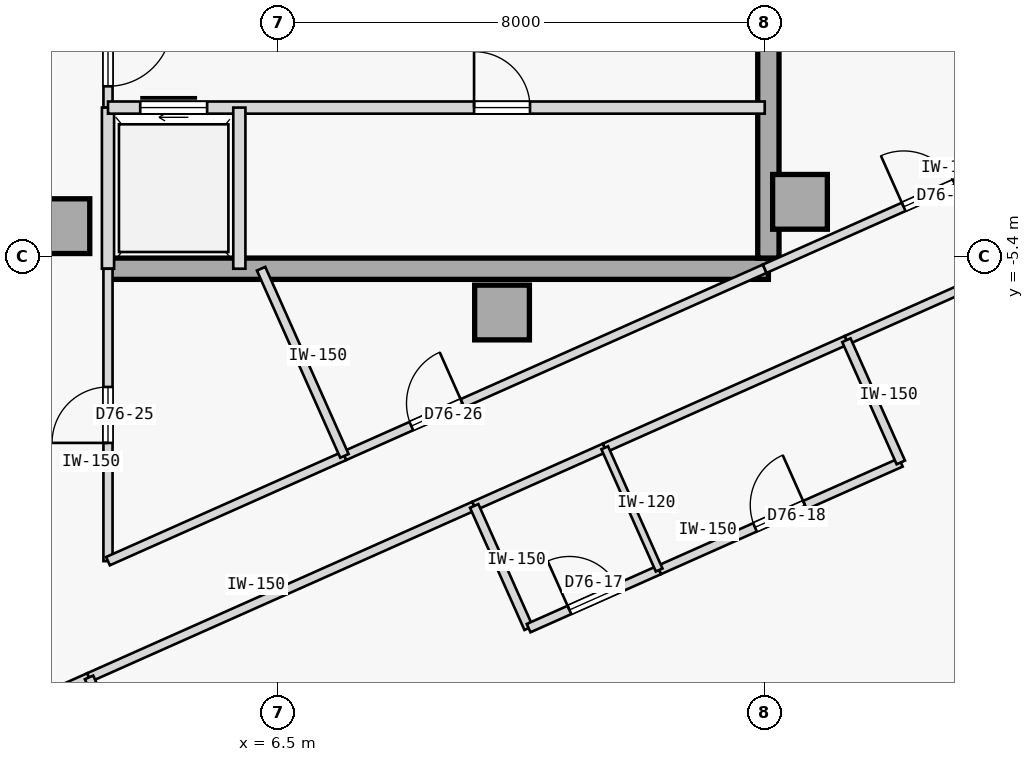
"""IFC4 building model, lengths in metres.
Left out: names, types, materials, properties, quantities, classifications, styles, units other than length and angle.
Written with IfcOpenShell. Run it as: python <this file> out.ifc"""

import sys

from ifc_helpers import new_model, si_unit, direction, frame, frame_2d, origin, origin_2d, place, context, subcontext, project, spatial, rectangle, extrude, element, fill, save


model = new_model("IFC4")
c1 = context("Model", 3, precision=1e-05, world=origin(), true_north=direction((0.0, 1.0)))
c2 = subcontext(c1, "Body", "Model", "MODEL_VIEW")
j1 = project(units=[si_unit("LENGTHUNIT", "METRE"), si_unit("PLANEANGLEUNIT", "RADIAN")], contexts=[c1])
p1 = place(None, origin())
s1 = spatial("IfcSite", under=j1, at=p1, CompositionType="ELEMENT")
p2 = place(p1, origin())
s2 = spatial("IfcBuilding", under=s1, at=p2, CompositionType="ELEMENT")
p3 = place(p2, frame((0.0, 0.0, 285.25)))
s3 = spatial("IfcBuildingStorey", under=s2, at=p3, CompositionType="ELEMENT", Elevation=285.25)
for number, where, z_axis, x_axis in (
    (1, (15.08, -4.5, 0.0), (0.0, 0.0, 1.0), (1.0, 0.0, 0.0)),
    (2, (10.18, -6.32, 0.0), (0.0, 0.0, 1.0), (1.0, 0.0, 0.0)),
    (3, (2.95, -4.9, 0.0), (0.0, 0.0, 1.0), (1.0, 0.0, 0.0)),
):
    element("IfcColumn", number, at=place(p3, frame(where, z_axis=z_axis, x_axis=x_axis)), inside=s3, PredefinedType="COLUMN", context=c2, shape_type="SweptSolid", body=[
        extrude(rectangle(XDim=0.9, YDim=0.9, at=origin_2d()), origin(), (0.0, 0.0, 1.0), 3.35),
    ])
p4 = place(p3, frame((3.7, -5.6, 0.0), z_axis=(0.0, 0.0, 1.0), x_axis=(1.0, 0.0, 0.0)))
e4 = element("IfcWall", 4, at=p4, inside=s3, PredefinedType="SHEAR", context=c2, shape_type="SweptSolid", body=[
    extrude(rectangle(XDim=10.86, YDim=0.35, at=frame_2d((5.43, 0.0))), origin(), (0.0, 0.0, 1.0), 3.125),
])
p5 = place(p3, frame((14.56, -5.425, 0.0), z_axis=(0.0, 0.0, 1.0), x_axis=(0.0, 1.0, 0.0)))
e5 = element("IfcWall", 5, at=p5, inside=s3, PredefinedType="SHEAR", context=c2, shape_type="SweptSolid", body=[
    extrude(rectangle(XDim=10.85, YDim=0.35, at=frame_2d((5.425, 0.0))), origin(), (0.0, 0.0, 1.0), 3.125),
])
p6 = place(p3, frame((3.7, -2.95, 0.0), z_axis=(0.0, 0.0, 1.0), x_axis=(0.0, 1.0, 0.0)))
e6 = element("IfcWall", 6, at=p6, inside=s3, PredefinedType="PARTITIONING", context=c2, shape_type="SweptSolid", body=[
    extrude(rectangle(XDim=1.8, YDim=0.15, at=frame_2d((0.9, 0.0))), origin(), (0.0, 0.0, 1.0), 3.125),
])
p7 = place(p6, frame((0.35, 0.0, 0.0)))
e7 = element("IfcOpeningElement", 7, at=p7, cuts=e6, PredefinedType="OPENING", context=c2, shape_type="SweptSolid", body=[
    extrude(rectangle(XDim=1.05, YDim=2.18, at=frame_2d((0.525, 1.09))), frame((0.0, 0.085, 0.0), z_axis=(0.0, -1.0, 0.0), x_axis=(1.0, 0.0, 0.0)), (0.0, 0.0, 1.0), 0.17),
])
p8 = place(p3, frame((3.7, -5.6, 0.0), z_axis=(0.0, 0.0, 1.0), x_axis=(0.0, 1.0, 0.0)))
e8 = element("IfcWall", 8, at=p8, inside=s3, PredefinedType="STANDARD", context=c2, shape_type="SweptSolid", body=[
    extrude(rectangle(XDim=2.65, YDim=0.2, at=frame_2d((1.325, 0.0))), origin(), (0.0, 0.0, 1.0), 3.125),
])
p9 = place(p3, frame((3.7, -2.95, 0.0), z_axis=(0.0, 0.0, 1.0), x_axis=(1.0, 0.0, 0.0)))
e9 = element("IfcWall", 9, at=p9, inside=s3, PredefinedType="STANDARD", context=c2, shape_type="SweptSolid", body=[
    extrude(rectangle(XDim=10.8, YDim=0.2, at=frame_2d((5.4, 0.0))), origin(), (0.0, 0.0, 1.0), 3.125),
])
p10 = place(p9, frame((0.53, 0.0, 0.0)))
e10 = element("IfcOpeningElement", 10, at=p10, cuts=e9, PredefinedType="OPENING", context=c2, shape_type="SweptSolid", body=[
    extrude(rectangle(XDim=1.1, YDim=2.15, at=frame_2d((0.55, 1.075))), frame((0.0, 0.11, 0.0), z_axis=(0.0, -1.0, 0.0), x_axis=(1.0, 0.0, 0.0)), (0.0, 0.0, 1.0), 0.22),
])
p11 = place(p9, frame((6.02, 0.0, 0.0)))
e11 = element("IfcOpeningElement", 11, at=p11, cuts=e9, PredefinedType="OPENING", context=c2, shape_type="SweptSolid", body=[
    extrude(rectangle(XDim=0.92, YDim=2.15, at=frame_2d((0.46, 1.075))), frame((0.0, 0.11, 0.0), z_axis=(0.0, -1.0, 0.0), x_axis=(1.0, 0.0, 0.0)), (0.0, 0.0, 1.0), 0.22),
])
p12 = place(p3, frame((5.86, -5.6, 0.0), z_axis=(0.0, 0.0, 1.0), x_axis=(0.0, 1.0, 0.0)))
e12 = element("IfcWall", 12, at=p12, inside=s3, PredefinedType="STANDARD", context=c2, shape_type="SweptSolid", body=[
    extrude(rectangle(XDim=2.65, YDim=0.2, at=frame_2d((1.325, 0.0))), origin(), (0.0, 0.0, 1.0), 3.125),
])
p13 = place(p3, frame((-8.481, -17.605, 0.0), z_axis=(0.0, 0.0, 1.0), x_axis=(0.913546352883, 0.406734632328, 0.0)))
e13 = element("IfcWall", 13, at=p13, inside=s3, PredefinedType="PARTITIONING", context=c2, shape_type="SweptSolid", body=[
    extrude(rectangle(XDim=12.993, YDim=0.15, at=frame_2d((6.497, 0.0))), origin(), (0.0, 0.0, 1.0), 3.125),
])
p14 = place(p13, frame((6.021, 0.0, 0.0)))
e14 = element("IfcOpeningElement", 14, at=p14, cuts=e13, PredefinedType="OPENING", context=c2, shape_type="SweptSolid", body=[
    extrude(rectangle(XDim=0.95, YDim=2.15, at=frame_2d((0.475, 1.075))), frame((0.0, 0.085, 0.0), z_axis=(0.0, -1.0, 0.0), x_axis=(1.0, 0.0, 0.0)), (0.0, 0.0, 1.0), 0.17),
])
p15 = place(p3, frame((3.388, -12.321, 0.0), z_axis=(0.0, 0.0, 1.0), x_axis=(0.913552886643, 0.406719956857, 0.0)))
e15 = element("IfcWall", 15, at=p15, inside=s3, PredefinedType="PARTITIONING", context=c2, shape_type="SweptSolid", body=[
    extrude(rectangle(XDim=6.933, YDim=0.15, at=frame_2d((3.467, 0.0))), origin(), (0.0, 0.0, 1.0), 3.125),
])
p16 = place(p3, frame((15.843, -6.776, 0.0), z_axis=(0.0, 0.0, 1.0), x_axis=(0.913541183414, 0.406746243015, 0.0)))
e16 = element("IfcWall", 16, at=p16, inside=s3, PredefinedType="PARTITIONING", context=c2, shape_type="SweptSolid", body=[
    extrude(rectangle(XDim=17.999, YDim=0.15, at=frame_2d((9.0, 0.0))), origin(), (0.0, 0.0, 1.0), 3.125),
])
p17 = place(p16, frame((8.524, 0.0, 0.0)))
e17 = element("IfcOpeningElement", 17, at=p17, cuts=e16, PredefinedType="OPENING", context=c2, shape_type="SweptSolid", body=[
    extrude(rectangle(XDim=0.95, YDim=2.15, at=frame_2d((0.475, 1.075))), frame((0.0, 0.085, 0.0), z_axis=(0.0, -1.0, 0.0), x_axis=(1.0, 0.0, 0.0)), (0.0, 0.0, 1.0), 0.17),
])
p18 = place(p3, frame((9.722, -9.501, 0.0), z_axis=(0.0, 0.0, 1.0), x_axis=(0.913541436194, 0.406745675276, 0.0)))
e18 = element("IfcWall", 18, at=p18, inside=s3, PredefinedType="PARTITIONING", context=c2, shape_type="SweptSolid", body=[
    extrude(rectangle(XDim=2.35, YDim=0.15, at=frame_2d((1.175, 0.0))), origin(), (0.0, 0.0, 1.0), 3.125),
])
p19 = place(p3, frame((11.869, -8.545, 0.0), z_axis=(0.0, 0.0, 1.0), x_axis=(0.913554477336, 0.406716383908, 0.0)))
e19 = element("IfcWall", 19, at=p19, inside=s3, PredefinedType="PARTITIONING", context=c2, shape_type="SweptSolid", body=[
    extrude(rectangle(XDim=4.35, YDim=0.15, at=frame_2d((2.175, 0.0))), origin(), (0.0, 0.0, 1.0), 3.125),
])
p20 = place(p3, frame((3.7, -10.409, 0.0), z_axis=(0.0, 0.0, 1.0), x_axis=(5.0769153e-05, 0.999999998711, 0.0)))
e20 = element("IfcWall", 20, at=p20, inside=s3, PredefinedType="PARTITIONING", context=c2, shape_type="SweptSolid", body=[
    extrude(rectangle(XDim=4.809, YDim=0.15, at=frame_2d((2.404, 0.0))), origin(), (0.0, 0.0, 1.0), 3.125),
])
p21 = place(p20, frame((1.944, 0.0, 0.0)))
e21 = element("IfcOpeningElement", 21, at=p21, cuts=e20, PredefinedType="OPENING", context=c2, shape_type="SweptSolid", body=[
    extrude(rectangle(XDim=0.92, YDim=2.15, at=frame_2d((0.46, 1.075))), frame((0.0, 0.085, 0.0), z_axis=(0.0, -1.0, 0.0), x_axis=(1.0, 0.0, 0.0)), (0.0, 0.0, 1.0), 0.17),
])
p22 = place(p3, frame((3.7, -10.409, 0.0), z_axis=(0.0, 0.0, 1.0), x_axis=(0.91353932002, 0.406750428122, 0.0)))
e22 = element("IfcWall", 22, at=p22, inside=s3, PredefinedType="PARTITIONING", context=c2, shape_type="SweptSolid", body=[
    extrude(rectangle(XDim=4.256, YDim=0.15, at=frame_2d((2.128, 0.0))), origin(), (0.0, 0.0, 1.0), 3.125),
])
p23 = place(p3, frame((7.588, -8.677, 0.0), z_axis=(0.0, 0.0, 1.0), x_axis=(0.913555880467, 0.406713232221, 0.0)))
e23 = element("IfcWall", 23, at=p23, inside=s3, PredefinedType="PARTITIONING", context=c2, shape_type="SweptSolid", body=[
    extrude(rectangle(XDim=7.566, YDim=0.15, at=frame_2d((3.783, 0.0))), origin(), (0.0, 0.0, 1.0), 3.125),
])
p24 = place(p23, frame((1.205, 0.0, 0.0)))
e24 = element("IfcOpeningElement", 24, at=p24, cuts=e23, PredefinedType="OPENING", context=c2, shape_type="SweptSolid", body=[
    extrude(rectangle(XDim=0.92, YDim=2.15, at=frame_2d((0.46, 1.075))), frame((0.0, 0.085, 0.0), z_axis=(0.0, -1.0, 0.0), x_axis=(1.0, 0.0, 0.0)), (0.0, 0.0, 1.0), 0.17),
])
p25 = place(p3, frame((14.5, -5.6, 0.0), z_axis=(0.0, 0.0, 1.0), x_axis=(0.913550607208, 0.406725076766, 0.0)))
e25 = element("IfcWall", 25, at=p25, inside=s3, PredefinedType="PARTITIONING", context=c2, shape_type="SweptSolid", body=[
    extrude(rectangle(XDim=4.556, YDim=0.15, at=frame_2d((2.278, 0.0))), origin(), (0.0, 0.0, 1.0), 3.125),
])
p26 = place(p25, frame((2.501, 0.0, 0.0)))
e26 = element("IfcOpeningElement", 26, at=p26, cuts=e25, PredefinedType="OPENING", context=c2, shape_type="SweptSolid", body=[
    extrude(rectangle(XDim=0.92, YDim=2.15, at=frame_2d((0.46, 1.075))), frame((0.0, 0.085, 0.0), z_axis=(0.0, -1.0, 0.0), x_axis=(1.0, 0.0, 0.0)), (0.0, 0.0, 1.0), 0.17),
])
p27 = place(p3, frame((7.267, -21.031, 0.0), z_axis=(0.0, 0.0, 1.0), x_axis=(-0.406751296215, 0.913538933504, 0.0)))
e27 = element("IfcWall", 27, at=p27, inside=s3, PredefinedType="PARTITIONING", context=c2, shape_type="SweptSolid", body=[
    extrude(rectangle(XDim=9.535, YDim=0.15, at=frame_2d((4.768, 0.0))), origin(), (0.0, 0.0, 1.0), 3.125),
])
p28 = place(p3, frame((10.617, -11.51, 0.0), z_axis=(0.0, 0.0, 1.0), x_axis=(-0.406725294076, 0.913550510459, 0.0)))
e28 = element("IfcWall", 28, at=p28, inside=s3, PredefinedType="PARTITIONING", context=c2, shape_type="SweptSolid", body=[
    extrude(rectangle(XDim=2.2, YDim=0.15, at=frame_2d((1.1, 0.0))), origin(), (0.0, 0.0, 1.0), 3.125),
])
p29 = place(p3, frame((10.617, -11.51, 0.0), z_axis=(0.0, 0.0, 1.0), x_axis=(0.913558622212, 0.406707073682, 0.0)))
e29 = element("IfcWall", 29, at=p29, inside=s3, PredefinedType="PARTITIONING", context=c2, shape_type="SweptSolid", body=[
    extrude(rectangle(XDim=2.35, YDim=0.15, at=frame_2d((1.175, 0.0))), origin(), (0.0, 0.0, 1.0), 3.125),
])
p30 = place(p29, frame((0.735, 0.0, 0.0)))
e30 = element("IfcOpeningElement", 30, at=p30, cuts=e29, PredefinedType="OPENING", context=c2, shape_type="SweptSolid", body=[
    extrude(rectangle(XDim=0.88, YDim=2.15, at=frame_2d((0.44, 1.075))), frame((0.0, 0.085, 0.0), z_axis=(0.0, -1.0, 0.0), x_axis=(1.0, 0.0, 0.0)), (0.0, 0.0, 1.0), 0.17),
])
p31 = place(p3, frame((12.764, -10.555, 0.0), z_axis=(0.0, 0.0, 1.0), x_axis=(0.913545193015, 0.406737237438, 0.0)))
e31 = element("IfcWall", 31, at=p31, inside=s3, PredefinedType="PARTITIONING", context=c2, shape_type="SweptSolid", body=[
    extrude(rectangle(XDim=4.35, YDim=0.15, at=frame_2d((2.175, 0.0))), origin(), (0.0, 0.0, 1.0), 3.125),
])
p32 = place(p31, frame((1.725, 0.0, 0.0)))
e32 = element("IfcOpeningElement", 32, at=p32, cuts=e31, PredefinedType="OPENING", context=c2, shape_type="SweptSolid", body=[
    extrude(rectangle(XDim=0.9, YDim=2.15, at=frame_2d((0.45, 1.075))), frame((0.0, 0.085, 0.0), z_axis=(0.0, -1.0, 0.0), x_axis=(1.0, 0.0, 0.0)), (0.0, 0.0, 1.0), 0.17),
])
p33 = place(p3, frame((16.738, -8.785, 0.0), z_axis=(0.0, 0.0, 1.0), x_axis=(-0.406725294076, 0.913550510459, 0.0)))
e33 = element("IfcWall", 33, at=p33, inside=s3, PredefinedType="PARTITIONING", context=c2, shape_type="SweptSolid", body=[
    extrude(rectangle(XDim=2.2, YDim=0.15, at=frame_2d((1.1, 0.0))), origin(), (0.0, 0.0, 1.0), 3.125),
])
p34 = place(p3, frame((12.764, -10.555, 0.0), z_axis=(0.0, 0.0, 1.0), x_axis=(-0.406817905151, 0.913509273105, 0.0)))
e34 = element("IfcWall", 34, at=p34, inside=s3, PredefinedType="PARTITIONING", context=c2, shape_type="SweptSolid", body=[
    extrude(rectangle(XDim=2.2, YDim=0.12, at=frame_2d((1.1, 0.0))), origin(), (0.0, 0.0, 1.0), 3.125),
])
p35 = place(p3, frame((7.588, -8.677, 0.0), z_axis=(0.0, 0.0, 1.0), x_axis=(-0.406763688861, 0.913533415603, 0.0)))
e35 = element("IfcWall", 35, at=p35, inside=s3, PredefinedType="PARTITIONING", context=c2, shape_type="SweptSolid", body=[
    extrude(rectangle(XDim=3.369, YDim=0.15, at=frame_2d((1.685, 0.0))), origin(), (0.0, 0.0, 1.0), 3.125),
])
p36 = place(p3, frame((18.662, -3.747, 0.0), z_axis=(0.0, 0.0, 1.0), x_axis=(-0.406740920471, 0.913543553212, 0.0)))
e36 = element("IfcWall", 36, at=p36, inside=s3, PredefinedType="PARTITIONING", context=c2, shape_type="SweptSolid", body=[
    extrude(rectangle(XDim=3.684, YDim=0.15, at=frame_2d((1.842, 0.0))), origin(), (0.0, 0.0, 1.0), 3.125),
])
p37 = place(p7, frame((1.05, 0.0, 0.0), z_axis=(0.0, 0.0, 1.0), x_axis=(-1.0, 0.0, 0.0)))
e37 = element("IfcDoor", 37, at=p37, inside=s3, OperationType="SINGLE_SWING_RIGHT", PredefinedType="DOOR", context=c2, shape_type="SweptSolid", body=[
    extrude(rectangle(XDim=1.05, YDim=2.18, at=frame_2d((0.525, 1.09))), frame((0.0, 0.025, 0.0), z_axis=(0.0, -1.0, 0.0), x_axis=(1.0, 0.0, 0.0)), (0.0, 0.0, 1.0), 0.05),
])
fill(e7, e37)
p38 = place(p10, origin())
e38 = element("IfcDoor", 38, at=p38, inside=s3, OperationType="SLIDING_TO_RIGHT", PredefinedType="DOOR", context=c2, shape_type="SweptSolid", body=[
    extrude(rectangle(XDim=1.1, YDim=2.15, at=frame_2d((0.55, 1.075))), frame((0.0, 0.025, 0.0), z_axis=(0.0, -1.0, 0.0), x_axis=(1.0, 0.0, 0.0)), (0.0, 0.0, 1.0), 0.05),
])
fill(e10, e38)
p39 = place(p11, origin())
e39 = element("IfcDoor", 39, at=p39, inside=s3, OperationType="SINGLE_SWING_LEFT", PredefinedType="DOOR", context=c2, shape_type="SweptSolid", body=[
    extrude(rectangle(XDim=0.92, YDim=2.15, at=frame_2d((0.46, 1.075))), frame((0.0, 0.025, 0.0), z_axis=(0.0, -1.0, 0.0), x_axis=(1.0, 0.0, 0.0)), (0.0, 0.0, 1.0), 0.05),
])
fill(e11, e39)
p40 = place(p30, origin())
e40 = element("IfcDoor", 40, at=p40, inside=s3, OperationType="SINGLE_SWING_LEFT", PredefinedType="DOOR", context=c2, shape_type="SweptSolid", body=[
    extrude(rectangle(XDim=0.88, YDim=2.15, at=frame_2d((0.44, 1.075))), frame((0.0, 0.025, 0.0), z_axis=(0.0, -1.0, 0.0), x_axis=(1.0, 0.0, 0.0)), (0.0, 0.0, 1.0), 0.05),
])
fill(e30, e40)
p41 = place(p32, origin())
e41 = element("IfcDoor", 41, at=p41, inside=s3, OperationType="SINGLE_SWING_RIGHT", PredefinedType="DOOR", context=c2, shape_type="SweptSolid", body=[
    extrude(rectangle(XDim=0.9, YDim=2.15, at=frame_2d((0.45, 1.075))), frame((0.0, 0.025, 0.0), z_axis=(0.0, -1.0, 0.0), x_axis=(1.0, 0.0, 0.0)), (0.0, 0.0, 1.0), 0.05),
])
fill(e32, e41)
p42 = place(p21, origin())
e42 = element("IfcDoor", 42, at=p42, inside=s3, OperationType="SINGLE_SWING_LEFT", PredefinedType="DOOR", context=c2, shape_type="SweptSolid", body=[
    extrude(rectangle(XDim=0.92, YDim=2.15, at=frame_2d((0.46, 1.075))), frame((0.0, 0.025, 0.0), z_axis=(0.0, -1.0, 0.0), x_axis=(1.0, 0.0, 0.0)), (0.0, 0.0, 1.0), 0.05),
])
fill(e21, e42)
p43 = place(p24, origin())
e43 = element("IfcDoor", 43, at=p43, inside=s3, OperationType="SINGLE_SWING_RIGHT", PredefinedType="DOOR", context=c2, shape_type="SweptSolid", body=[
    extrude(rectangle(XDim=0.92, YDim=2.15, at=frame_2d((0.46, 1.075))), frame((0.0, 0.025, 0.0), z_axis=(0.0, -1.0, 0.0), x_axis=(1.0, 0.0, 0.0)), (0.0, 0.0, 1.0), 0.05),
])
fill(e24, e43)
p44 = place(p26, origin())
e44 = element("IfcDoor", 44, at=p44, inside=s3, OperationType="SINGLE_SWING_LEFT", PredefinedType="DOOR", context=c2, shape_type="SweptSolid", body=[
    extrude(rectangle(XDim=0.92, YDim=2.15, at=frame_2d((0.46, 1.075))), frame((0.0, 0.025, 0.0), z_axis=(0.0, -1.0, 0.0), x_axis=(1.0, 0.0, 0.0)), (0.0, 0.0, 1.0), 0.05),
])
fill(e26, e44)
save(model, sys.argv[1])
